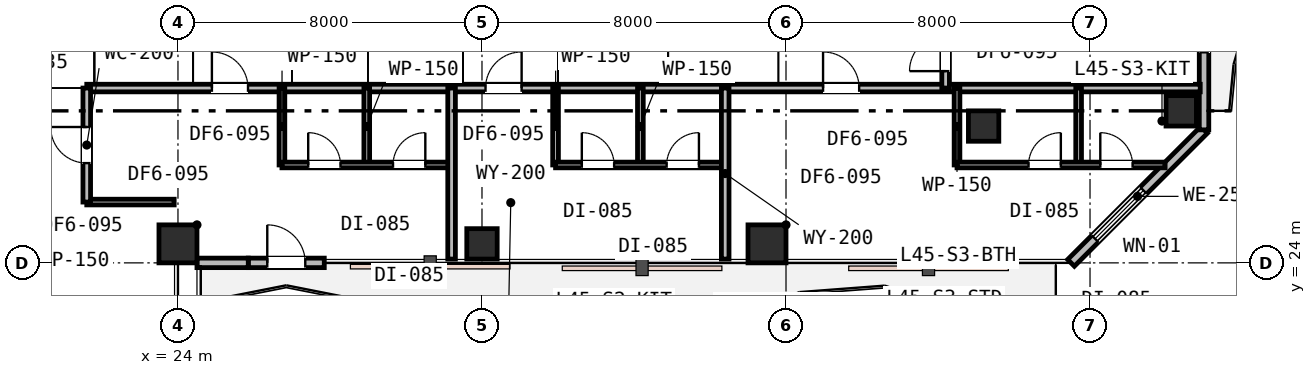
"""IFC4 building model, lengths in metres.
Left out: names, types, materials, properties, quantities, classifications, styles, units other than length and angle.
Written with IfcOpenShell. Run it as: python <this file> out.ifc"""

import sys

from ifc_helpers import new_model, si_unit, direction, frame, frame_2d, origin, origin_2d, place, context, subcontext, project, spatial, rectangle, extrude, element, fill, save


model = new_model("IFC4")
c1 = context("Model", 3, precision=1e-05, world=origin(), true_north=direction((0.0, 1.0)))
c2 = subcontext(c1, "Body", "Model", "MODEL_VIEW")
j1 = project(units=[si_unit("LENGTHUNIT", "METRE"), si_unit("PLANEANGLEUNIT", "RADIAN")], contexts=[c1])
p1 = place(None, origin())
s1 = spatial("IfcSite", under=j1, at=p1, CompositionType="ELEMENT")
p2 = place(p1, origin())
s2 = spatial("IfcBuilding", under=s1, at=p2, CompositionType="ELEMENT")
p3 = place(p2, frame((0.0, 0.0, 175.8)))
s3 = spatial("IfcBuildingStorey", under=s2, at=p3, CompositionType="ELEMENT", Elevation=175.8)
p4 = place(p3, frame((24.0, 24.5, 0.0), z_axis=(0.0, 0.0, 1.0), x_axis=(1.0, 0.0, 0.0)))
e1 = element("IfcColumn", 1, at=p4, inside=s3, PredefinedType="COLUMN", context=c2, shape_type="SweptSolid", body=[
    extrude(rectangle(XDim=1.0, YDim=1.0, at=origin_2d()), origin(), (0.0, 0.0, 1.0), 3.6),
])
p5 = place(p3, frame((32.0, 24.5, 0.0), z_axis=(0.0, 0.0, 1.0), x_axis=(1.0, 0.0, 0.0)))
e2 = element("IfcColumn", 2, at=p5, inside=s3, PredefinedType="COLUMN", context=c2, shape_type="SweptSolid", body=[
    extrude(rectangle(XDim=0.8, YDim=0.8, at=origin_2d()), origin(), (0.0, 0.0, 1.0), 3.6),
])
p6 = place(p3, frame((39.5, 24.5, 0.0), z_axis=(0.0, 0.0, 1.0), x_axis=(1.0, 0.0, 0.0)))
e3 = element("IfcColumn", 3, at=p6, inside=s3, PredefinedType="COLUMN", context=c2, shape_type="SweptSolid", body=[
    extrude(rectangle(XDim=1.0, YDim=1.0, at=origin_2d()), origin(), (0.0, 0.0, 1.0), 3.6),
])
for number, where, z_axis, x_axis in (
    (4, (45.2, 27.6, 0.0), (0.0, 0.0, 1.0), (1.0, 0.0, 0.0)),
    (5, (50.4, 28.0, 0.0), (0.0, 0.0, 1.0), (1.0, 0.0, 0.0)),
):
    element("IfcColumn", number, at=place(p3, frame(where, z_axis=z_axis, x_axis=x_axis)), inside=s3, PredefinedType="COLUMN", context=c2, shape_type="SweptSolid", body=[
        extrude(rectangle(XDim=0.8, YDim=0.8, at=origin_2d()), origin(), (0.0, 0.0, 1.0), 3.6),
    ])
p7 = place(p3, frame((25.85, 24.0, 0.0), z_axis=(0.0, 0.0, 1.0), x_axis=(1.0, 0.0, 0.0)))
e6 = element("IfcWall", 6, at=p7, inside=s3, PredefinedType="STANDARD", context=c2, shape_type="SweptSolid", body=[
    extrude(rectangle(XDim=2.0, YDim=0.25, at=frame_2d((1.0, 0.0))), origin(), (0.0, 0.0, 1.0), 3.02),
])
p8 = place(p7, frame((0.5, 0.0, 0.0)))
e7 = element("IfcOpeningElement", 7, at=p8, cuts=e6, PredefinedType="OPENING", context=c2, shape_type="SweptSolid", body=[
    extrude(rectangle(XDim=1.0, YDim=2.15, at=frame_2d((0.5, 1.075))), frame((0.0, 0.135, 0.0), z_axis=(0.0, -1.0, 0.0), x_axis=(1.0, 0.0, 0.0)), (0.0, 0.0, 1.0), 0.27),
])
p9 = place(p3, frame((24.5, 24.0, 0.0), z_axis=(0.0, 0.0, 1.0), x_axis=(1.0, 0.0, 0.0)))
e8 = element("IfcWall", 8, at=p9, inside=s3, PredefinedType="STANDARD", context=c2, shape_type="SweptSolid", body=[
    extrude(rectangle(XDim=1.35, YDim=0.25, at=frame_2d((0.675, 0.0))), origin(), (0.0, 0.0, 1.0), 3.02),
])
p10 = place(p3, frame((47.5, 24.0, 0.0), z_axis=(0.0, 0.0, 1.0), x_axis=(0.707106781187, 0.707106781187, 0.0)))
e9 = element("IfcWall", 9, at=p10, inside=s3, PredefinedType="STANDARD", context=c2, shape_type="SweptSolid", body=[
    extrude(rectangle(XDim=4.95, YDim=0.25, at=frame_2d((2.475, 0.0))), origin(), (0.0, 0.0, 1.0), 3.33),
])
p11 = place(p10, frame((0.896, 0.0, 0.75)))
e10 = element("IfcOpeningElement", 10, at=p11, cuts=e9, PredefinedType="OPENING", context=c2, shape_type="SweptSolid", body=[
    extrude(rectangle(XDim=1.8, YDim=1.85, at=frame_2d((0.9, 0.925))), frame((0.0, 0.135, 0.0), z_axis=(0.0, -1.0, 0.0), x_axis=(1.0, 0.0, 0.0)), (0.0, 0.0, 1.0), 0.27),
])
p12 = place(p3, frame((51.0, 27.5, 0.0), z_axis=(0.0, 0.0, 1.0), x_axis=(0.0, 1.0, 0.0)))
e11 = element("IfcWall", 11, at=p12, inside=s3, PredefinedType="STANDARD", context=c2, shape_type="SweptSolid", body=[
    extrude(rectangle(XDim=4.2, YDim=0.25, at=frame_2d((2.1, 0.0))), origin(), (0.0, 0.0, 1.0), 3.33),
])
p13 = place(p12, frame((2.04, 0.0, 0.85)))
e12 = element("IfcOpeningElement", 12, at=p13, cuts=e11, PredefinedType="OPENING", context=c2, shape_type="SweptSolid", body=[
    extrude(rectangle(XDim=1.2, YDim=1.6, at=frame_2d((0.6, 0.8))), frame((0.0, 0.135, 0.0), z_axis=(0.0, -1.0, 0.0), x_axis=(1.0, 0.0, 0.0)), (0.0, 0.0, 1.0), 0.27),
])
p14 = place(p3, frame((21.6, 28.6, 0.0), z_axis=(0.0, 0.0, 1.0), x_axis=(1.0, 0.0, 0.0)))
e13 = element("IfcWall", 13, at=p14, inside=s3, PredefinedType="PARTITIONING", context=c2, shape_type="SweptSolid", body=[
    extrude(rectangle(XDim=29.3, YDim=0.2, at=frame_2d((14.65, 0.0))), origin(), (0.0, 0.0, 1.0), 2.92),
])
p15 = place(p14, frame((3.293, 0.0, 0.0)))
e14 = element("IfcOpeningElement", 14, at=p15, cuts=e13, PredefinedType="OPENING", context=c2, shape_type="SweptSolid", body=[
    extrude(rectangle(XDim=0.95, YDim=2.15, at=frame_2d((0.475, 1.075))), frame((0.0, 0.11, 0.0), z_axis=(0.0, -1.0, 0.0), x_axis=(1.0, 0.0, 0.0)), (0.0, 0.0, 1.0), 0.22),
])
p16 = place(p14, frame((10.493, 0.0, 0.0)))
e15 = element("IfcOpeningElement", 15, at=p16, cuts=e13, PredefinedType="OPENING", context=c2, shape_type="SweptSolid", body=[
    extrude(rectangle(XDim=0.95, YDim=2.15, at=frame_2d((0.475, 1.075))), frame((0.0, 0.11, 0.0), z_axis=(0.0, -1.0, 0.0), x_axis=(1.0, 0.0, 0.0)), (0.0, 0.0, 1.0), 0.22),
])
p17 = place(p14, frame((19.375, 0.0, 0.0)))
e16 = element("IfcOpeningElement", 16, at=p17, cuts=e13, PredefinedType="OPENING", context=c2, shape_type="SweptSolid", body=[
    extrude(rectangle(XDim=0.95, YDim=2.15, at=frame_2d((0.475, 1.075))), frame((0.0, 0.11, 0.0), z_axis=(0.0, -1.0, 0.0), x_axis=(1.0, 0.0, 0.0)), (0.0, 0.0, 1.0), 0.22),
])
p18 = place(p3, frame((44.2, 28.6, 0.0), z_axis=(0.0, 0.0, 1.0), x_axis=(0.0, 1.0, 0.0)))
e17 = element("IfcWall", 17, at=p18, inside=s3, PredefinedType="PARTITIONING", context=c2, shape_type="SweptSolid", body=[
    extrude(rectangle(XDim=14.3, YDim=0.2, at=frame_2d((7.15, 0.0))), origin(), (0.0, 0.0, 1.0), 2.92),
])
p19 = place(p18, frame((0.445, 0.0, 0.0)))
e18 = element("IfcOpeningElement", 18, at=p19, cuts=e17, PredefinedType="OPENING", context=c2, shape_type="SweptSolid", body=[
    extrude(rectangle(XDim=0.95, YDim=2.15, at=frame_2d((0.475, 1.075))), frame((0.0, 0.11, 0.0), z_axis=(0.0, -1.0, 0.0), x_axis=(1.0, 0.0, 0.0)), (0.0, 0.0, 1.0), 0.22),
])
for number, where, z_axis, x_axis in (
    (19, (26.736, 26.576, 0.0), (0.0, 0.0, 1.0), (0.0, 1.0, 0.0)),
    (20, (28.968, 26.576, 0.0), (0.0, 0.0, 1.0), (0.0, 1.0, 0.0)),
):
    element("IfcWall", number, at=place(p3, frame(where, z_axis=z_axis, x_axis=x_axis)), inside=s3, PredefinedType="PARTITIONING", context=c2, shape_type="SweptSolid", body=[
        extrude(rectangle(XDim=2.024, YDim=0.15, at=frame_2d((1.012, 0.0))), origin(), (0.0, 0.0, 1.0), 3.07),
    ])
p20 = place(p3, frame((26.736, 26.576, 0.0), z_axis=(0.0, 0.0, 1.0), x_axis=(1.0, 0.0, 0.0)))
e21 = element("IfcWall", 21, at=p20, inside=s3, PredefinedType="PARTITIONING", context=c2, shape_type="SweptSolid", body=[
    extrude(rectangle(XDim=4.464, YDim=0.15, at=frame_2d((2.232, 0.0))), origin(), (0.0, 0.0, 1.0), 3.07),
])
p21 = place(p20, frame((0.691, 0.0, 0.0)))
e22 = element("IfcOpeningElement", 22, at=p21, cuts=e21, PredefinedType="OPENING", context=c2, shape_type="SweptSolid", body=[
    extrude(rectangle(XDim=0.85, YDim=2.15, at=frame_2d((0.425, 1.075))), frame((0.0, 0.085, 0.0), z_axis=(0.0, -1.0, 0.0), x_axis=(1.0, 0.0, 0.0)), (0.0, 0.0, 1.0), 0.17),
])
p22 = place(p20, frame((2.923, 0.0, 0.0)))
e23 = element("IfcOpeningElement", 23, at=p22, cuts=e21, PredefinedType="OPENING", context=c2, shape_type="SweptSolid", body=[
    extrude(rectangle(XDim=0.85, YDim=2.15, at=frame_2d((0.425, 1.075))), frame((0.0, 0.085, 0.0), z_axis=(0.0, -1.0, 0.0), x_axis=(1.0, 0.0, 0.0)), (0.0, 0.0, 1.0), 0.17),
])
p23 = place(p3, frame((31.2, 24.1, 0.0), z_axis=(0.0, 0.0, 1.0), x_axis=(0.0, 1.0, 0.0)))
e24 = element("IfcWall", 24, at=p23, inside=s3, PredefinedType="PARTITIONING", context=c2, shape_type="SweptSolid", body=[
    extrude(rectangle(XDim=4.5, YDim=0.2, at=frame_2d((2.25, 0.0))), origin(), (0.0, 0.0, 1.0), 3.02),
])
for number, where, z_axis, x_axis in (
    (25, (33.936, 26.576, 0.0), (0.0, 0.0, 1.0), (0.0, 1.0, 0.0)),
    (26, (36.168, 26.576, 0.0), (0.0, 0.0, 1.0), (0.0, 1.0, 0.0)),
):
    element("IfcWall", number, at=place(p3, frame(where, z_axis=z_axis, x_axis=x_axis)), inside=s3, PredefinedType="PARTITIONING", context=c2, shape_type="SweptSolid", body=[
        extrude(rectangle(XDim=2.024, YDim=0.15, at=frame_2d((1.012, 0.0))), origin(), (0.0, 0.0, 1.0), 3.33),
    ])
p24 = place(p3, frame((33.936, 26.576, 0.0), z_axis=(0.0, 0.0, 1.0), x_axis=(1.0, 0.0, 0.0)))
e27 = element("IfcWall", 27, at=p24, inside=s3, PredefinedType="PARTITIONING", context=c2, shape_type="SweptSolid", body=[
    extrude(rectangle(XDim=4.464, YDim=0.15, at=frame_2d((2.232, 0.0))), origin(), (0.0, 0.0, 1.0), 3.07),
])
p25 = place(p24, frame((0.691, 0.0, 0.0)))
e28 = element("IfcOpeningElement", 28, at=p25, cuts=e27, PredefinedType="OPENING", context=c2, shape_type="SweptSolid", body=[
    extrude(rectangle(XDim=0.85, YDim=2.15, at=frame_2d((0.425, 1.075))), frame((0.0, 0.085, 0.0), z_axis=(0.0, -1.0, 0.0), x_axis=(1.0, 0.0, 0.0)), (0.0, 0.0, 1.0), 0.17),
])
p26 = place(p24, frame((2.923, 0.0, 0.0)))
e29 = element("IfcOpeningElement", 29, at=p26, cuts=e27, PredefinedType="OPENING", context=c2, shape_type="SweptSolid", body=[
    extrude(rectangle(XDim=0.85, YDim=2.15, at=frame_2d((0.425, 1.075))), frame((0.0, 0.085, 0.0), z_axis=(0.0, -1.0, 0.0), x_axis=(1.0, 0.0, 0.0)), (0.0, 0.0, 1.0), 0.17),
])
p27 = place(p3, frame((38.4, 24.1, 0.0), z_axis=(0.0, 0.0, 1.0), x_axis=(0.0, 1.0, 0.0)))
e30 = element("IfcWall", 30, at=p27, inside=s3, PredefinedType="PARTITIONING", context=c2, shape_type="SweptSolid", body=[
    extrude(rectangle(XDim=4.5, YDim=0.2, at=frame_2d((2.25, 0.0))), origin(), (0.0, 0.0, 1.0), 3.02),
])
for number, where, z_axis, x_axis in (
    (31, (44.5, 26.576, 0.0), (0.0, 0.0, 1.0), (0.0, 1.0, 0.0)),
    (32, (47.7, 26.576, 0.0), (0.0, 0.0, 1.0), (0.0, 1.0, 0.0)),
):
    element("IfcWall", number, at=place(p3, frame(where, z_axis=z_axis, x_axis=x_axis)), inside=s3, PredefinedType="PARTITIONING", context=c2, shape_type="SweptSolid", body=[
        extrude(rectangle(XDim=2.024, YDim=0.15, at=frame_2d((1.012, 0.0))), origin(), (0.0, 0.0, 1.0), 3.33),
    ])
p28 = place(p3, frame((44.5, 26.576, 0.0), z_axis=(0.0, 0.0, 1.0), x_axis=(1.0, 0.0, 0.0)))
e33 = element("IfcWall", 33, at=p28, inside=s3, PredefinedType="PARTITIONING", context=c2, shape_type="SweptSolid", body=[
    extrude(rectangle(XDim=5.476, YDim=0.15, at=frame_2d((2.738, 0.0))), origin(), (0.0, 0.0, 1.0), 3.33),
])
p29 = place(p28, frame((1.882, 0.0, 0.0)))
e34 = element("IfcOpeningElement", 34, at=p29, cuts=e33, PredefinedType="OPENING", context=c2, shape_type="SweptSolid", body=[
    extrude(rectangle(XDim=0.85, YDim=2.15, at=frame_2d((0.425, 1.075))), frame((0.0, 0.085, 0.0), z_axis=(0.0, -1.0, 0.0), x_axis=(1.0, 0.0, 0.0)), (0.0, 0.0, 1.0), 0.17),
])
p30 = place(p28, frame((3.77, 0.0, 0.0)))
e35 = element("IfcOpeningElement", 35, at=p30, cuts=e33, PredefinedType="OPENING", context=c2, shape_type="SweptSolid", body=[
    extrude(rectangle(XDim=0.85, YDim=2.15, at=frame_2d((0.425, 1.075))), frame((0.0, 0.085, 0.0), z_axis=(0.0, -1.0, 0.0), x_axis=(1.0, 0.0, 0.0)), (0.0, 0.0, 1.0), 0.17),
])
p31 = place(p3, frame((21.6, 25.6, 0.0), z_axis=(0.0, 0.0, 1.0), x_axis=(1.0, 0.0, 0.0)))
e36 = element("IfcWall", 36, at=p31, inside=s3, PredefinedType="PARTITIONING", context=c2, shape_type="SweptSolid", body=[
    extrude(rectangle(XDim=2.3, YDim=0.15, at=frame_2d((1.15, 0.0))), origin(), (0.0, 0.0, 1.0), 2.92),
])
p32 = place(p3, frame((21.6, 25.6, 0.0), z_axis=(0.0, 0.0, 1.0), x_axis=(0.0, 1.0, 0.0)))
e37 = element("IfcWall", 37, at=p32, inside=s3, PredefinedType="PARTITIONING", context=c2, shape_type="SweptSolid", body=[
    extrude(rectangle(XDim=3.0, YDim=0.2, at=frame_2d((1.5, 0.0))), origin(), (0.0, 0.0, 1.0), 3.07),
])
p33 = place(p32, frame((1.025, 0.0, 0.0)))
e38 = element("IfcOpeningElement", 38, at=p33, cuts=e37, PredefinedType="OPENING", context=c2, shape_type="SweptSolid", body=[
    extrude(rectangle(XDim=0.95, YDim=2.15, at=frame_2d((0.475, 1.075))), frame((0.0, 0.11, 0.0), z_axis=(0.0, -1.0, 0.0), x_axis=(1.0, 0.0, 0.0)), (0.0, 0.0, 1.0), 0.22),
])
p34 = place(p8, origin())
e39 = element("IfcDoor", 39, at=p34, inside=s3, OperationType="SINGLE_SWING_LEFT", PredefinedType="DOOR", context=c2, shape_type="SweptSolid", body=[
    extrude(rectangle(XDim=1.0, YDim=2.15, at=frame_2d((0.5, 1.075))), frame((0.0, 0.025, 0.0), z_axis=(0.0, -1.0, 0.0), x_axis=(1.0, 0.0, 0.0)), (0.0, 0.0, 1.0), 0.05),
])
fill(e7, e39)
p35 = place(p11, origin())
e40 = element("IfcWindow", 40, at=p35, inside=s3, PartitioningType="SINGLE_PANEL", PredefinedType="WINDOW", context=c2, shape_type="SweptSolid", body=[
    extrude(rectangle(XDim=1.8, YDim=1.85, at=frame_2d((0.9, 0.925))), frame((0.0, 0.03, 0.0), z_axis=(0.0, -1.0, 0.0), x_axis=(1.0, 0.0, 0.0)), (0.0, 0.0, 1.0), 0.06),
])
fill(e10, e40)
p36 = place(p19, origin())
e41 = element("IfcDoor", 41, at=p36, inside=s3, OperationType="SINGLE_SWING_LEFT", PredefinedType="DOOR", context=c2, shape_type="SweptSolid", body=[
    extrude(rectangle(XDim=0.95, YDim=2.15, at=frame_2d((0.475, 1.075))), frame((0.0, 0.025, 0.0), z_axis=(0.0, -1.0, 0.0), x_axis=(1.0, 0.0, 0.0)), (0.0, 0.0, 1.0), 0.05),
])
fill(e18, e41)
p37 = place(p15, origin())
e42 = element("IfcDoor", 42, at=p37, inside=s3, OperationType="SINGLE_SWING_LEFT", PredefinedType="DOOR", context=c2, shape_type="SweptSolid", body=[
    extrude(rectangle(XDim=0.95, YDim=2.15, at=frame_2d((0.475, 1.075))), frame((0.0, 0.025, 0.0), z_axis=(0.0, -1.0, 0.0), x_axis=(1.0, 0.0, 0.0)), (0.0, 0.0, 1.0), 0.05),
])
fill(e14, e42)
p38 = place(p21, origin())
e43 = element("IfcDoor", 43, at=p38, inside=s3, OperationType="SINGLE_SWING_LEFT", PredefinedType="DOOR", context=c2, shape_type="SweptSolid", body=[
    extrude(rectangle(XDim=0.85, YDim=2.15, at=frame_2d((0.425, 1.075))), frame((0.0, 0.025, 0.0), z_axis=(0.0, -1.0, 0.0), x_axis=(1.0, 0.0, 0.0)), (0.0, 0.0, 1.0), 0.05),
])
fill(e22, e43)
p39 = place(p22, origin())
e44 = element("IfcDoor", 44, at=p39, inside=s3, OperationType="SINGLE_SWING_RIGHT", PredefinedType="DOOR", context=c2, shape_type="SweptSolid", body=[
    extrude(rectangle(XDim=0.85, YDim=2.15, at=frame_2d((0.425, 1.075))), frame((0.0, 0.025, 0.0), z_axis=(0.0, -1.0, 0.0), x_axis=(1.0, 0.0, 0.0)), (0.0, 0.0, 1.0), 0.05),
])
fill(e23, e44)
p40 = place(p16, origin())
e45 = element("IfcDoor", 45, at=p40, inside=s3, OperationType="SINGLE_SWING_RIGHT", PredefinedType="DOOR", context=c2, shape_type="SweptSolid", body=[
    extrude(rectangle(XDim=0.95, YDim=2.15, at=frame_2d((0.475, 1.075))), frame((0.0, 0.025, 0.0), z_axis=(0.0, -1.0, 0.0), x_axis=(1.0, 0.0, 0.0)), (0.0, 0.0, 1.0), 0.05),
])
fill(e15, e45)
p41 = place(p25, origin())
e46 = element("IfcDoor", 46, at=p41, inside=s3, OperationType="SINGLE_SWING_LEFT", PredefinedType="DOOR", context=c2, shape_type="SweptSolid", body=[
    extrude(rectangle(XDim=0.85, YDim=2.15, at=frame_2d((0.425, 1.075))), frame((0.0, 0.025, 0.0), z_axis=(0.0, -1.0, 0.0), x_axis=(1.0, 0.0, 0.0)), (0.0, 0.0, 1.0), 0.05),
])
fill(e28, e46)
p42 = place(p26, origin())
e47 = element("IfcDoor", 47, at=p42, inside=s3, OperationType="SINGLE_SWING_RIGHT", PredefinedType="DOOR", context=c2, shape_type="SweptSolid", body=[
    extrude(rectangle(XDim=0.85, YDim=2.15, at=frame_2d((0.425, 1.075))), frame((0.0, 0.025, 0.0), z_axis=(0.0, -1.0, 0.0), x_axis=(1.0, 0.0, 0.0)), (0.0, 0.0, 1.0), 0.05),
])
fill(e29, e47)
p43 = place(p17, origin())
e48 = element("IfcDoor", 48, at=p43, inside=s3, OperationType="SINGLE_SWING_LEFT", PredefinedType="DOOR", context=c2, shape_type="SweptSolid", body=[
    extrude(rectangle(XDim=0.95, YDim=2.15, at=frame_2d((0.475, 1.075))), frame((0.0, 0.025, 0.0), z_axis=(0.0, -1.0, 0.0), x_axis=(1.0, 0.0, 0.0)), (0.0, 0.0, 1.0), 0.05),
])
fill(e16, e48)
p44 = place(p29, origin())
e49 = element("IfcDoor", 49, at=p44, inside=s3, OperationType="SINGLE_SWING_RIGHT", PredefinedType="DOOR", context=c2, shape_type="SweptSolid", body=[
    extrude(rectangle(XDim=0.85, YDim=2.15, at=frame_2d((0.425, 1.075))), frame((0.0, 0.025, 0.0), z_axis=(0.0, -1.0, 0.0), x_axis=(1.0, 0.0, 0.0)), (0.0, 0.0, 1.0), 0.05),
])
fill(e34, e49)
p45 = place(p30, origin())
e50 = element("IfcDoor", 50, at=p45, inside=s3, OperationType="SINGLE_SWING_LEFT", PredefinedType="DOOR", context=c2, shape_type="SweptSolid", body=[
    extrude(rectangle(XDim=0.85, YDim=2.15, at=frame_2d((0.425, 1.075))), frame((0.0, 0.025, 0.0), z_axis=(0.0, -1.0, 0.0), x_axis=(1.0, 0.0, 0.0)), (0.0, 0.0, 1.0), 0.05),
])
fill(e35, e50)
p46 = place(p33, origin())
e51 = element("IfcDoor", 51, at=p46, inside=s3, OperationType="SINGLE_SWING_RIGHT", PredefinedType="DOOR", context=c2, shape_type="SweptSolid", body=[
    extrude(rectangle(XDim=0.95, YDim=2.15, at=frame_2d((0.475, 1.075))), frame((0.0, 0.025, 0.0), z_axis=(0.0, -1.0, 0.0), x_axis=(1.0, 0.0, 0.0)), (0.0, 0.0, 1.0), 0.05),
])
fill(e38, e51)
save(model, sys.argv[1])
